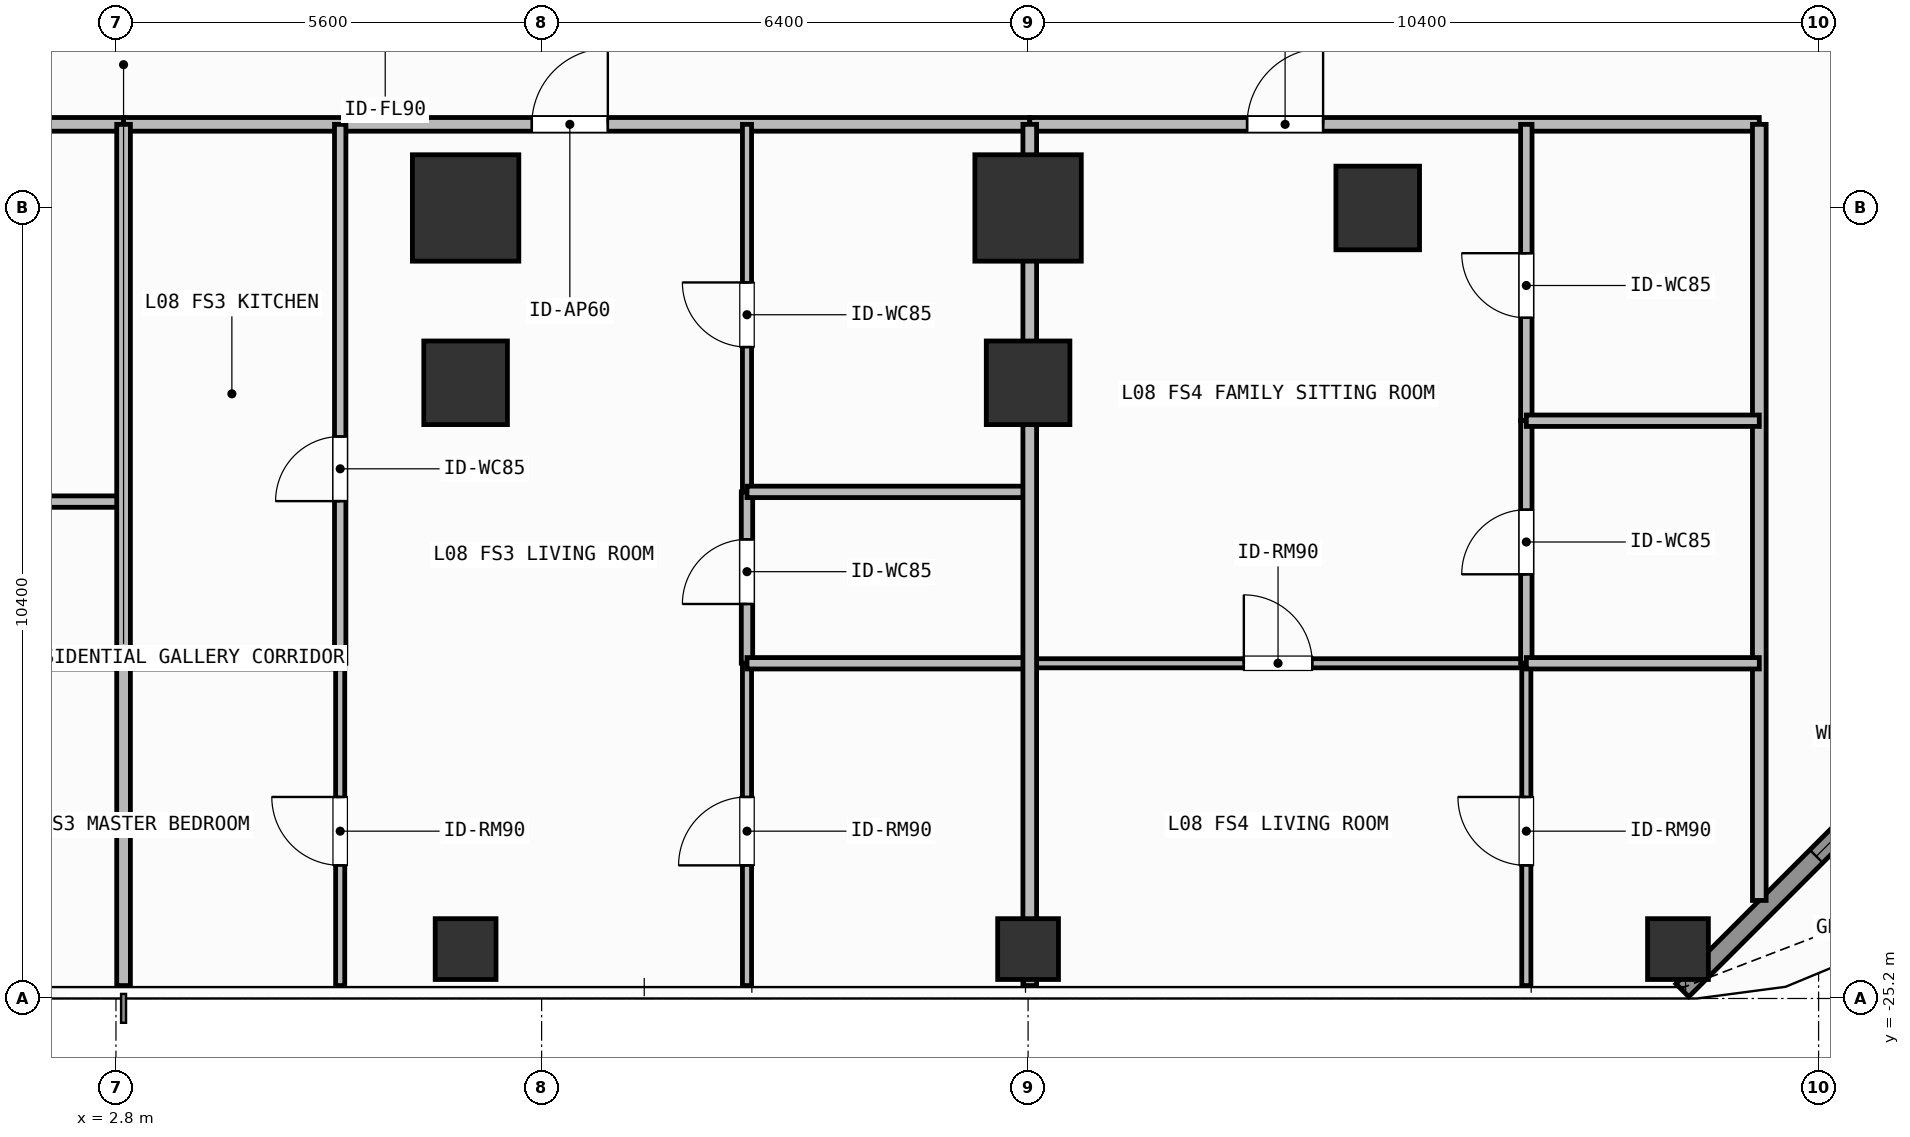
"""IFC4 building model, lengths in metres.
Left out: names, types, materials, properties, quantities, classifications, styles, units other than length and angle.
Written with IfcOpenShell. Run it as: python <this file> out.ifc"""

import sys

from ifc_helpers import new_model, si_unit, direction, frame, frame_2d, origin, origin_2d, place, context, subcontext, project, spatial, rectangle, hollow_rectangle, extrude, element, fill, save


model = new_model("IFC4")
c1 = context("Model", 3, precision=1e-05, world=origin(), true_north=direction((0.0, 1.0)))
c2 = subcontext(c1, "Body", "Model", "MODEL_VIEW")
j1 = project(units=[si_unit("LENGTHUNIT", "METRE"), si_unit("PLANEANGLEUNIT", "RADIAN")], contexts=[c1])
p1 = place(None, origin())
s1 = spatial("IfcSite", under=j1, at=p1, CompositionType="ELEMENT")
p2 = place(p1, origin())
s2 = spatial("IfcBuilding", under=s1, at=p2, CompositionType="ELEMENT")
p3 = place(p2, frame((0.0, 0.0, 30.6)))
s3 = spatial("IfcBuildingStorey", under=s2, at=p3, CompositionType="ELEMENT", Elevation=30.6)
for number, where, z_axis, x_axis in (
    (1, (7.4, -14.8, 0.0), (0.0, 0.0, 1.0), (1.0, 0.0, 0.0)),
    (2, (14.8, -14.8, 0.0), (0.0, 0.0, 1.0), (1.0, 0.0, 0.0)),
):
    element("IfcColumn", number, at=place(p3, frame(where, z_axis=z_axis, x_axis=x_axis)), inside=s3, PredefinedType="COLUMN", context=c2, shape_type="SweptSolid", body=[
        extrude(rectangle(XDim=1.4, YDim=1.4, at=origin_2d()), origin(), (0.0, 0.0, 1.0), 3.9),
    ])
for number, where, z_axis, x_axis in (
    (3, (19.4, -14.8, 0.0), (0.0, 0.0, 1.0), (1.0, 0.0, 0.0)),
    (4, (7.4, -17.1, 0.0), (0.0, 0.0, 1.0), (1.0, 0.0, 0.0)),
    (5, (14.8, -17.1, 0.0), (0.0, 0.0, 1.0), (1.0, 0.0, 0.0)),
):
    element("IfcColumn", number, at=place(p3, frame(where, z_axis=z_axis, x_axis=x_axis)), inside=s3, PredefinedType="COLUMN", context=c2, shape_type="SweptSolid", body=[
        extrude(rectangle(XDim=1.1, YDim=1.1, at=origin_2d()), origin(), (0.0, 0.0, 1.0), 3.9),
    ])
for number, where, z_axis, x_axis in (
    (6, (23.35, -24.55, 0.0), (0.0, 0.0, 1.0), (1.0, 0.0, 0.0)),
    (7, (7.4, -24.55, 0.0), (0.0, 0.0, 1.0), (1.0, 0.0, 0.0)),
    (8, (14.8, -24.55, 0.0), (0.0, 0.0, 1.0), (1.0, 0.0, 0.0)),
):
    element("IfcColumn", number, at=place(p3, frame(where, z_axis=z_axis, x_axis=x_axis)), inside=s3, PredefinedType="COLUMN", context=c2, shape_type="SweptSolid", body=[
        extrude(hollow_rectangle(XDim=0.8, YDim=0.8, WallThickness=0.036, at=origin_2d()), origin(), (0.0, 0.0, 1.0), 3.9),
    ])
p4 = place(p3, frame((27.992, -20.508, 0.0), z_axis=(0.0, 0.0, 1.0), x_axis=(-0.707106781187, -0.707106781187, 0.0)))
e9 = element("IfcWall", 9, at=p4, inside=s3, PredefinedType="SOLIDWALL", context=c2, shape_type="SweptSolid", body=[
    extrude(rectangle(XDim=6.484, YDim=0.24, at=frame_2d((3.242, 0.0))), origin(), (0.0, 0.0, 1.0), 3.68),
])
p5 = place(p4, frame((2.492, 0.0, 0.8)))
e10 = element("IfcOpeningElement", 10, at=p5, cuts=e9, PredefinedType="OPENING", context=c2, shape_type="SweptSolid", body=[
    extrude(rectangle(XDim=1.5, YDim=1.85, at=frame_2d((0.75, 0.925))), frame((0.0, 0.13, 0.0), z_axis=(0.0, -1.0, 0.0), x_axis=(1.0, 0.0, 0.0)), (0.0, 0.0, 1.0), 0.26),
])
p6 = place(p3, frame((-9.151, -13.7, 0.0), z_axis=(0.0, 0.0, 1.0), x_axis=(1.0, 0.0, 0.0)))
e11 = element("IfcWall", 11, at=p6, inside=s3, PredefinedType="PARTITIONING", context=c2, shape_type="SweptSolid", body=[
    extrude(rectangle(XDim=12.051, YDim=0.18, at=frame_2d((6.025, 0.0))), origin(), (0.0, 0.0, 1.0), 3.68),
])
p7 = place(p6, frame((4.989, 0.0, 0.0)))
e12 = element("IfcOpeningElement", 12, at=p7, cuts=e11, PredefinedType="OPENING", context=c2, shape_type="SweptSolid", body=[
    extrude(rectangle(XDim=1.0, YDim=2.2, at=frame_2d((0.5, 1.1))), frame((0.0, 0.1, 0.0), z_axis=(0.0, -1.0, 0.0), x_axis=(1.0, 0.0, 0.0)), (0.0, 0.0, 1.0), 0.2),
])
p8 = place(p3, frame((2.9, -13.7, 0.0), z_axis=(0.0, 0.0, 1.0), x_axis=(1.0, 0.0, 0.0)))
e13 = element("IfcWall", 13, at=p8, inside=s3, PredefinedType="PARTITIONING", context=c2, shape_type="SweptSolid", body=[
    extrude(rectangle(XDim=11.922, YDim=0.18, at=frame_2d((5.961, 0.0))), origin(), (0.0, 0.0, 1.0), 3.68),
])
p9 = place(p8, frame((5.371, 0.0, 0.0)))
e14 = element("IfcOpeningElement", 14, at=p9, cuts=e13, PredefinedType="OPENING", context=c2, shape_type="SweptSolid", body=[
    extrude(rectangle(XDim=1.0, YDim=2.2, at=frame_2d((0.5, 1.1))), frame((0.0, 0.1, 0.0), z_axis=(0.0, -1.0, 0.0), x_axis=(1.0, 0.0, 0.0)), (0.0, 0.0, 1.0), 0.2),
])
p10 = place(p3, frame((5.75, -20.79, 0.0), z_axis=(0.0, 0.0, 1.0), x_axis=(0.0, 1.0, 0.0)))
e15 = element("IfcWall", 15, at=p10, inside=s3, PredefinedType="PARTITIONING", context=c2, shape_type="SweptSolid", body=[
    extrude(rectangle(XDim=7.09, YDim=0.15, at=frame_2d((3.545, 0.0))), origin(), (0.0, 0.0, 1.0), 3.68),
])
p11 = place(p10, frame((2.133, 0.0, 0.0)))
e16 = element("IfcOpeningElement", 16, at=p11, cuts=e15, PredefinedType="OPENING", context=c2, shape_type="SweptSolid", body=[
    extrude(rectangle(XDim=0.85, YDim=2.1, at=frame_2d((0.425, 1.05))), frame((0.0, 0.085, 0.0), z_axis=(0.0, -1.0, 0.0), x_axis=(1.0, 0.0, 0.0)), (0.0, 0.0, 1.0), 0.17),
])
p12 = place(p3, frame((5.75, -25.03, 0.0), z_axis=(0.0, 0.0, 1.0), x_axis=(0.0, 1.0, 0.0)))
e17 = element("IfcWall", 17, at=p12, inside=s3, PredefinedType="PARTITIONING", context=c2, shape_type="SweptSolid", body=[
    extrude(rectangle(XDim=4.24, YDim=0.12, at=frame_2d((2.12, 0.0))), origin(), (0.0, 0.0, 1.0), 3.68),
])
p13 = place(p12, frame((1.581, 0.0, 0.0)))
e18 = element("IfcOpeningElement", 18, at=p13, cuts=e17, PredefinedType="OPENING", context=c2, shape_type="SweptSolid", body=[
    extrude(rectangle(XDim=0.9, YDim=2.1, at=frame_2d((0.45, 1.05))), frame((0.0, 0.07, 0.0), z_axis=(0.0, -1.0, 0.0), x_axis=(1.0, 0.0, 0.0)), (0.0, 0.0, 1.0), 0.14),
])
p14 = place(p3, frame((11.102, -20.79, 0.0), z_axis=(0.0, 0.0, 1.0), x_axis=(0.0, 1.0, 0.0)))
e19 = element("IfcWall", 19, at=p14, inside=s3, PredefinedType="PARTITIONING", context=c2, shape_type="SweptSolid", body=[
    extrude(rectangle(XDim=2.255, YDim=0.15, at=frame_2d((1.127, 0.0))), origin(), (0.0, 0.0, 1.0), 3.37),
])
p15 = place(p14, frame((0.78, 0.0, 0.0)))
e20 = element("IfcOpeningElement", 20, at=p15, cuts=e19, PredefinedType="OPENING", context=c2, shape_type="SweptSolid", body=[
    extrude(rectangle(XDim=0.85, YDim=2.1, at=frame_2d((0.425, 1.05))), frame((0.0, 0.085, 0.0), z_axis=(0.0, -1.0, 0.0), x_axis=(1.0, 0.0, 0.0)), (0.0, 0.0, 1.0), 0.17),
])
p16 = place(p3, frame((11.102, -18.535, 0.0), z_axis=(0.0, 0.0, 1.0), x_axis=(0.0, 1.0, 0.0)))
e21 = element("IfcWall", 21, at=p16, inside=s3, PredefinedType="PARTITIONING", context=c2, shape_type="SweptSolid", body=[
    extrude(rectangle(XDim=4.835, YDim=0.12, at=frame_2d((2.417, 0.0))), origin(), (0.0, 0.0, 1.0), 3.37),
])
p17 = place(p16, frame((1.905, 0.0, 0.0)))
e22 = element("IfcOpeningElement", 22, at=p17, cuts=e21, PredefinedType="OPENING", context=c2, shape_type="SweptSolid", body=[
    extrude(rectangle(XDim=0.85, YDim=2.1, at=frame_2d((0.425, 1.05))), frame((0.0, 0.07, 0.0), z_axis=(0.0, -1.0, 0.0), x_axis=(1.0, 0.0, 0.0)), (0.0, 0.0, 1.0), 0.14),
])
p18 = place(p3, frame((11.102, -25.03, 0.0), z_axis=(0.0, 0.0, 1.0), x_axis=(0.0, 1.0, 0.0)))
e23 = element("IfcWall", 23, at=p18, inside=s3, PredefinedType="PARTITIONING", context=c2, shape_type="SweptSolid", body=[
    extrude(rectangle(XDim=4.24, YDim=0.12, at=frame_2d((2.12, 0.0))), origin(), (0.0, 0.0, 1.0), 3.37),
])
p19 = place(p18, frame((1.581, 0.0, 0.0)))
e24 = element("IfcOpeningElement", 24, at=p19, cuts=e23, PredefinedType="OPENING", context=c2, shape_type="SweptSolid", body=[
    extrude(rectangle(XDim=0.9, YDim=2.1, at=frame_2d((0.45, 1.05))), frame((0.0, 0.07, 0.0), z_axis=(0.0, -1.0, 0.0), x_axis=(1.0, 0.0, 0.0)), (0.0, 0.0, 1.0), 0.14),
])
p20 = place(p3, frame((14.822, -13.7, 0.0), z_axis=(0.0, 0.0, 1.0), x_axis=(1.0, 0.0, 0.0)))
e25 = element("IfcWall", 25, at=p20, inside=s3, PredefinedType="PARTITIONING", context=c2, shape_type="SweptSolid", body=[
    extrude(rectangle(XDim=9.598, YDim=0.18, at=frame_2d((4.799, 0.0))), origin(), (0.0, 0.0, 1.0), 3.68),
])
p21 = place(p20, frame((2.859, 0.0, 0.0)))
e26 = element("IfcOpeningElement", 26, at=p21, cuts=e25, PredefinedType="OPENING", context=c2, shape_type="SweptSolid", body=[
    extrude(rectangle(XDim=1.0, YDim=2.2, at=frame_2d((0.5, 1.1))), frame((0.0, 0.1, 0.0), z_axis=(0.0, -1.0, 0.0), x_axis=(1.0, 0.0, 0.0)), (0.0, 0.0, 1.0), 0.2),
])
p22 = place(p3, frame((14.822, -20.79, 0.0), z_axis=(0.0, 0.0, 1.0), x_axis=(1.0, 0.0, 0.0)))
e27 = element("IfcWall", 27, at=p22, inside=s3, PredefinedType="PARTITIONING", context=c2, shape_type="SweptSolid", body=[
    extrude(rectangle(XDim=6.533, YDim=0.12, at=frame_2d((3.267, 0.0))), origin(), (0.0, 0.0, 1.0), 3.68),
])
p23 = place(p22, frame((2.816, 0.0, 0.0)))
e28 = element("IfcOpeningElement", 28, at=p23, cuts=e27, PredefinedType="OPENING", context=c2, shape_type="SweptSolid", body=[
    extrude(rectangle(XDim=0.9, YDim=2.1, at=frame_2d((0.45, 1.05))), frame((0.0, 0.07, 0.0), z_axis=(0.0, -1.0, 0.0), x_axis=(1.0, 0.0, 0.0)), (0.0, 0.0, 1.0), 0.14),
])
p24 = place(p3, frame((21.355, -17.599, 0.0), z_axis=(0.0, 0.0, 1.0), x_axis=(0.0, 1.0, 0.0)))
e29 = element("IfcWall", 29, at=p24, inside=s3, PredefinedType="PARTITIONING", context=c2, shape_type="SweptSolid", body=[
    extrude(rectangle(XDim=3.899, YDim=0.15, at=frame_2d((1.95, 0.0))), origin(), (0.0, 0.0, 1.0), 3.68),
])
p25 = place(p24, frame((1.354, 0.0, 0.0)))
e30 = element("IfcOpeningElement", 30, at=p25, cuts=e29, PredefinedType="OPENING", context=c2, shape_type="SweptSolid", body=[
    extrude(rectangle(XDim=0.85, YDim=2.1, at=frame_2d((0.425, 1.05))), frame((0.0, 0.085, 0.0), z_axis=(0.0, -1.0, 0.0), x_axis=(1.0, 0.0, 0.0)), (0.0, 0.0, 1.0), 0.17),
])
p26 = place(p3, frame((21.355, -20.79, 0.0), z_axis=(0.0, 0.0, 1.0), x_axis=(0.0, 1.0, 0.0)))
e31 = element("IfcWall", 31, at=p26, inside=s3, PredefinedType="PARTITIONING", context=c2, shape_type="SweptSolid", body=[
    extrude(rectangle(XDim=3.191, YDim=0.15, at=frame_2d((1.595, 0.0))), origin(), (0.0, 0.0, 1.0), 3.68),
])
p27 = place(p26, frame((1.17, 0.0, 0.0)))
e32 = element("IfcOpeningElement", 32, at=p27, cuts=e31, PredefinedType="OPENING", context=c2, shape_type="SweptSolid", body=[
    extrude(rectangle(XDim=0.85, YDim=2.1, at=frame_2d((0.425, 1.05))), frame((0.0, 0.085, 0.0), z_axis=(0.0, -1.0, 0.0), x_axis=(1.0, 0.0, 0.0)), (0.0, 0.0, 1.0), 0.17),
])
p28 = place(p3, frame((21.355, -25.03, 0.0), z_axis=(0.0, 0.0, 1.0), x_axis=(0.0, 1.0, 0.0)))
e33 = element("IfcWall", 33, at=p28, inside=s3, PredefinedType="PARTITIONING", context=c2, shape_type="SweptSolid", body=[
    extrude(rectangle(XDim=4.24, YDim=0.12, at=frame_2d((2.12, 0.0))), origin(), (0.0, 0.0, 1.0), 3.68),
])
p29 = place(p28, frame((1.581, 0.0, 0.0)))
e34 = element("IfcOpeningElement", 34, at=p29, cuts=e33, PredefinedType="OPENING", context=c2, shape_type="SweptSolid", body=[
    extrude(rectangle(XDim=0.9, YDim=2.1, at=frame_2d((0.45, 1.05))), frame((0.0, 0.07, 0.0), z_axis=(0.0, -1.0, 0.0), x_axis=(1.0, 0.0, 0.0)), (0.0, 0.0, 1.0), 0.14),
])
p30 = place(p3, frame((24.42, -23.91, 0.0), z_axis=(0.0, 0.0, 1.0), x_axis=(0.0, 1.0, 0.0)))
e35 = element("IfcWall", 35, at=p30, inside=s3, PredefinedType="PARTITIONING", context=c2, shape_type="SweptSolid", body=[
    extrude(rectangle(XDim=10.21, YDim=0.18, at=frame_2d((5.105, 0.0))), origin(), (0.0, 0.0, 1.0), 3.68),
])
for number, where, z_axis, x_axis in (
    (36, (-1.92, -18.663, 0.0), (0.0, 0.0, 1.0), (1.0, 0.0, 0.0)),
    (37, (-1.92, -20.79, 0.0), (0.0, 0.0, 1.0), (1.0, 0.0, 0.0)),
):
    element("IfcWall", number, at=place(p3, frame(where, z_axis=z_axis, x_axis=x_axis)), inside=s3, PredefinedType="PARTITIONING", context=c2, shape_type="SweptSolid", body=[
        extrude(rectangle(XDim=4.82, YDim=0.15, at=frame_2d((2.41, 0.0))), origin(), (0.0, 0.0, 1.0), 3.68),
    ])
p31 = place(p3, frame((2.9, -20.79, 0.0), z_axis=(0.0, 0.0, 1.0), x_axis=(1.0, 0.0, 0.0)))
e38 = element("IfcWall", 38, at=p31, inside=s3, PredefinedType="PARTITIONING", context=c2, shape_type="SweptSolid", body=[
    extrude(rectangle(XDim=2.85, YDim=0.15, at=frame_2d((1.425, 0.0))), origin(), (0.0, 0.0, 1.0), 3.68),
])
for number, where, z_axis, x_axis in (
    (39, (11.102, -18.535, 0.0), (0.0, 0.0, 1.0), (1.0, 0.0, 0.0)),
    (40, (11.102, -20.79, 0.0), (0.0, 0.0, 1.0), (1.0, 0.0, 0.0)),
):
    element("IfcWall", number, at=place(p3, frame(where, z_axis=z_axis, x_axis=x_axis)), inside=s3, PredefinedType="PARTITIONING", context=c2, shape_type="SweptSolid", body=[
        extrude(rectangle(XDim=3.72, YDim=0.15, at=frame_2d((1.86, 0.0))), origin(), (0.0, 0.0, 1.0), 3.68),
    ])
p32 = place(p3, frame((2.9, -25.03, 0.0), z_axis=(0.0, 0.0, 1.0), x_axis=(0.0, 1.0, 0.0)))
e41 = element("IfcWall", 41, at=p32, inside=s3, PredefinedType="PARTITIONING", context=c2, shape_type="SweptSolid", body=[
    extrude(rectangle(XDim=11.33, YDim=0.18, at=frame_2d((5.665, 0.0))), origin(), (0.0, 0.0, 1.0), 3.68),
])
for number, where, z_axis, x_axis in (
    (42, (21.355, -17.599, 0.0), (0.0, 0.0, 1.0), (1.0, 0.0, 0.0)),
    (43, (21.355, -20.79, 0.0), (0.0, 0.0, 1.0), (1.0, 0.0, 0.0)),
):
    element("IfcWall", number, at=place(p3, frame(where, z_axis=z_axis, x_axis=x_axis)), inside=s3, PredefinedType="PARTITIONING", context=c2, shape_type="SweptSolid", body=[
        extrude(rectangle(XDim=3.065, YDim=0.15, at=frame_2d((1.532, 0.0))), origin(), (0.0, 0.0, 1.0), 3.68),
    ])
p33 = place(p3, frame((14.822, -25.03, 0.0), z_axis=(0.0, 0.0, 1.0), x_axis=(0.0, 1.0, 0.0)))
e44 = element("IfcWall", 44, at=p33, inside=s3, PredefinedType="PARTITIONING", context=c2, shape_type="SweptSolid", body=[
    extrude(rectangle(XDim=11.33, YDim=0.18, at=frame_2d((5.665, 0.0))), origin(), (0.0, 0.0, 1.0), 3.082),
])
p34 = place(p5, origin())
e45 = element("IfcWindow", 45, at=p34, inside=s3, PartitioningType="SINGLE_PANEL", PredefinedType="WINDOW", context=c2, shape_type="SweptSolid", body=[
    extrude(rectangle(XDim=1.5, YDim=1.85, at=frame_2d((0.75, 0.925))), frame((0.0, 0.03, 0.0), z_axis=(0.0, -1.0, 0.0), x_axis=(1.0, 0.0, 0.0)), (0.0, 0.0, 1.0), 0.06),
])
fill(e10, e45)
p35 = place(p9, origin())
e46 = element("IfcDoor", 46, at=p35, inside=s3, OperationType="SINGLE_SWING_RIGHT", PredefinedType="DOOR", context=c2, shape_type="SweptSolid", body=[
    extrude(rectangle(XDim=1.0, YDim=2.2, at=frame_2d((0.5, 1.1))), frame((0.0, 0.025, 0.0), z_axis=(0.0, -1.0, 0.0), x_axis=(1.0, 0.0, 0.0)), (0.0, 0.0, 1.0), 0.05),
])
fill(e14, e46)
p36 = place(p11, origin())
e47 = element("IfcDoor", 47, at=p36, inside=s3, OperationType="SINGLE_SWING_LEFT", PredefinedType="DOOR", context=c2, shape_type="SweptSolid", body=[
    extrude(rectangle(XDim=0.85, YDim=2.1, at=frame_2d((0.425, 1.05))), frame((0.0, 0.025, 0.0), z_axis=(0.0, -1.0, 0.0), x_axis=(1.0, 0.0, 0.0)), (0.0, 0.0, 1.0), 0.05),
])
fill(e16, e47)
p37 = place(p13, origin())
e48 = element("IfcDoor", 48, at=p37, inside=s3, OperationType="SINGLE_SWING_RIGHT", PredefinedType="DOOR", context=c2, shape_type="SweptSolid", body=[
    extrude(rectangle(XDim=0.9, YDim=2.1, at=frame_2d((0.45, 1.05))), frame((0.0, 0.025, 0.0), z_axis=(0.0, -1.0, 0.0), x_axis=(1.0, 0.0, 0.0)), (0.0, 0.0, 1.0), 0.05),
])
fill(e18, e48)
p38 = place(p15, origin())
e49 = element("IfcDoor", 49, at=p38, inside=s3, OperationType="SINGLE_SWING_LEFT", PredefinedType="DOOR", context=c2, shape_type="SweptSolid", body=[
    extrude(rectangle(XDim=0.85, YDim=2.1, at=frame_2d((0.425, 1.05))), frame((0.0, 0.025, 0.0), z_axis=(0.0, -1.0, 0.0), x_axis=(1.0, 0.0, 0.0)), (0.0, 0.0, 1.0), 0.05),
])
fill(e20, e49)
p39 = place(p17, origin())
e50 = element("IfcDoor", 50, at=p39, inside=s3, OperationType="SINGLE_SWING_RIGHT", PredefinedType="DOOR", context=c2, shape_type="SweptSolid", body=[
    extrude(rectangle(XDim=0.85, YDim=2.1, at=frame_2d((0.425, 1.05))), frame((0.0, 0.025, 0.0), z_axis=(0.0, -1.0, 0.0), x_axis=(1.0, 0.0, 0.0)), (0.0, 0.0, 1.0), 0.05),
])
fill(e22, e50)
p40 = place(p19, origin())
e51 = element("IfcDoor", 51, at=p40, inside=s3, OperationType="SINGLE_SWING_LEFT", PredefinedType="DOOR", context=c2, shape_type="SweptSolid", body=[
    extrude(rectangle(XDim=0.9, YDim=2.1, at=frame_2d((0.45, 1.05))), frame((0.0, 0.025, 0.0), z_axis=(0.0, -1.0, 0.0), x_axis=(1.0, 0.0, 0.0)), (0.0, 0.0, 1.0), 0.05),
])
fill(e24, e51)
p41 = place(p21, origin())
e52 = element("IfcDoor", 52, at=p41, inside=s3, OperationType="SINGLE_SWING_RIGHT", PredefinedType="DOOR", context=c2, shape_type="SweptSolid", body=[
    extrude(rectangle(XDim=1.0, YDim=2.2, at=frame_2d((0.5, 1.1))), frame((0.0, 0.025, 0.0), z_axis=(0.0, -1.0, 0.0), x_axis=(1.0, 0.0, 0.0)), (0.0, 0.0, 1.0), 0.05),
])
fill(e26, e52)
p42 = place(p23, origin())
e53 = element("IfcDoor", 53, at=p42, inside=s3, OperationType="SINGLE_SWING_LEFT", PredefinedType="DOOR", context=c2, shape_type="SweptSolid", body=[
    extrude(rectangle(XDim=0.9, YDim=2.1, at=frame_2d((0.45, 1.05))), frame((0.0, 0.025, 0.0), z_axis=(0.0, -1.0, 0.0), x_axis=(1.0, 0.0, 0.0)), (0.0, 0.0, 1.0), 0.05),
])
fill(e28, e53)
p43 = place(p25, origin())
e54 = element("IfcDoor", 54, at=p43, inside=s3, OperationType="SINGLE_SWING_RIGHT", PredefinedType="DOOR", context=c2, shape_type="SweptSolid", body=[
    extrude(rectangle(XDim=0.85, YDim=2.1, at=frame_2d((0.425, 1.05))), frame((0.0, 0.025, 0.0), z_axis=(0.0, -1.0, 0.0), x_axis=(1.0, 0.0, 0.0)), (0.0, 0.0, 1.0), 0.05),
])
fill(e30, e54)
p44 = place(p27, origin())
e55 = element("IfcDoor", 55, at=p44, inside=s3, OperationType="SINGLE_SWING_LEFT", PredefinedType="DOOR", context=c2, shape_type="SweptSolid", body=[
    extrude(rectangle(XDim=0.85, YDim=2.1, at=frame_2d((0.425, 1.05))), frame((0.0, 0.025, 0.0), z_axis=(0.0, -1.0, 0.0), x_axis=(1.0, 0.0, 0.0)), (0.0, 0.0, 1.0), 0.05),
])
fill(e32, e55)
p45 = place(p29, origin())
e56 = element("IfcDoor", 56, at=p45, inside=s3, OperationType="SINGLE_SWING_RIGHT", PredefinedType="DOOR", context=c2, shape_type="SweptSolid", body=[
    extrude(rectangle(XDim=0.9, YDim=2.1, at=frame_2d((0.45, 1.05))), frame((0.0, 0.025, 0.0), z_axis=(0.0, -1.0, 0.0), x_axis=(1.0, 0.0, 0.0)), (0.0, 0.0, 1.0), 0.05),
])
fill(e34, e56)
save(model, sys.argv[1])
